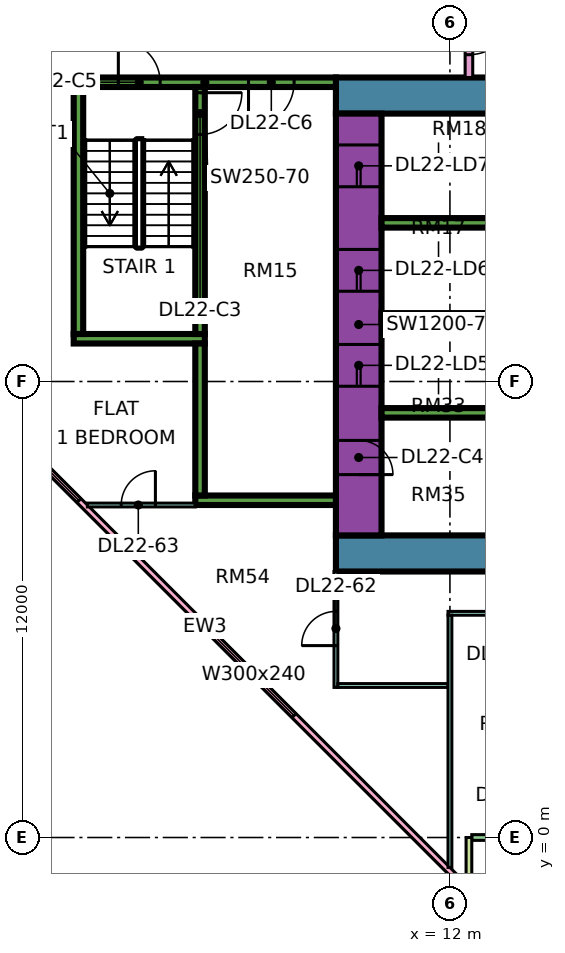
"""IFC4 building model, lengths in metres.
Left out: names, types, materials, properties, quantities, classifications, styles, units other than length and angle.
Written with IfcOpenShell. Run it as: python <this file> out.ifc"""

import sys

from ifc_helpers import new_model, si_unit, direction, frame, frame_2d, origin, place, context, subcontext, project, spatial, rectangle, extrude, element, fill, save


model = new_model("IFC4")
c1 = context("Model", 3, precision=1e-05, world=origin(), true_north=direction((0.0, 1.0)))
c2 = subcontext(c1, "Body", "Model", "MODEL_VIEW")
j1 = project(units=[si_unit("LENGTHUNIT", "METRE"), si_unit("PLANEANGLEUNIT", "RADIAN")], contexts=[c1])
p1 = place(None, origin())
s1 = spatial("IfcSite", under=j1, at=p1, CompositionType="ELEMENT")
p2 = place(p1, origin())
s2 = spatial("IfcBuilding", under=s1, at=p2, CompositionType="ELEMENT")
p3 = place(p2, frame((0.0, 0.0, 99.4)))
s3 = spatial("IfcBuildingStorey", under=s2, at=p3, CompositionType="ELEMENT", Elevation=99.4)
p4 = place(p3, frame((9.0, 7.475, 0.0), z_axis=(0.0, 0.0, 1.0), x_axis=(1.0, 0.0, 0.0)))
e1 = element("IfcWall", 1, at=p4, inside=s3, PredefinedType="SHEAR", context=c2, shape_type="SweptSolid", body=[
    extrude(rectangle(XDim=25.0, YDim=0.95, at=frame_2d((12.5, 0.0))), origin(), (0.0, 0.0, 1.0), 3.75),
])
p5 = place(p3, frame((9.0, 19.525, 0.0), z_axis=(0.0, 0.0, 1.0), x_axis=(1.0, 0.0, 0.0)))
e2 = element("IfcWall", 2, at=p5, inside=s3, PredefinedType="SHEAR", context=c2, shape_type="SweptSolid", body=[
    extrude(rectangle(XDim=25.0, YDim=0.95, at=frame_2d((12.5, 0.0))), origin(), (0.0, 0.0, 1.0), 3.75),
])
p6 = place(p5, frame((19.1, 0.0, 0.0)))
e3 = element("IfcOpeningElement", 3, at=p6, cuts=e2, PredefinedType="OPENING", context=c2, shape_type="SweptSolid", body=[
    extrude(rectangle(XDim=1.8, YDim=2.4, at=frame_2d((0.9, 1.2))), frame((0.0, 0.485, 0.0), z_axis=(0.0, -1.0, 0.0), x_axis=(1.0, 0.0, 0.0)), (0.0, 0.0, 1.0), 0.97),
])
p7 = place(p3, frame((9.6, 7.95, 0.0), z_axis=(0.0, 0.0, 1.0), x_axis=(0.0, 1.0, 0.0)))
e4 = element("IfcWall", 4, at=p7, inside=s3, PredefinedType="SHEAR", context=c2, shape_type="SweptSolid", body=[
    extrude(rectangle(XDim=11.1, YDim=1.2, at=frame_2d((5.55, 0.0))), origin(), (0.0, 0.0, 1.0), 3.75),
])
p8 = place(p7, frame((3.925, 0.0, 0.0)))
e5 = element("IfcOpeningElement", 5, at=p8, cuts=e4, PredefinedType="OPENING", context=c2, shape_type="SweptSolid", body=[
    extrude(rectangle(XDim=1.1, YDim=2.2, at=frame_2d((0.55, 1.1))), frame((0.0, 0.61, 0.0), z_axis=(0.0, -1.0, 0.0), x_axis=(1.0, 0.0, 0.0)), (0.0, 0.0, 1.0), 1.22),
])
p9 = place(p7, frame((6.425, 0.0, 0.0)))
e6 = element("IfcOpeningElement", 6, at=p9, cuts=e4, PredefinedType="OPENING", context=c2, shape_type="SweptSolid", body=[
    extrude(rectangle(XDim=1.1, YDim=2.2, at=frame_2d((0.55, 1.1))), frame((0.0, 0.61, 0.0), z_axis=(0.0, -1.0, 0.0), x_axis=(1.0, 0.0, 0.0)), (0.0, 0.0, 1.0), 1.22),
])
p10 = place(p7, frame((9.175, 0.0, 0.0)))
e7 = element("IfcOpeningElement", 7, at=p10, cuts=e4, PredefinedType="OPENING", context=c2, shape_type="SweptSolid", body=[
    extrude(rectangle(XDim=1.1, YDim=2.2, at=frame_2d((0.55, 1.1))), frame((0.0, 0.61, 0.0), z_axis=(0.0, -1.0, 0.0), x_axis=(1.0, 0.0, 0.0)), (0.0, 0.0, 1.0), 1.22),
])
p11 = place(p7, frame((1.6, 0.0, 0.0)))
e8 = element("IfcOpeningElement", 8, at=p11, cuts=e4, PredefinedType="OPENING", context=c2, shape_type="SweptSolid", body=[
    extrude(rectangle(XDim=0.9, YDim=2.1, at=frame_2d((0.45, 1.05))), frame((0.0, 0.61, 0.0), z_axis=(0.0, -1.0, 0.0), x_axis=(1.0, 0.0, 0.0)), (0.0, 0.0, 1.0), 1.22),
])
for number, where, z_axis, x_axis in (
    (9, (10.2, 11.175, 0.0), (0.0, 0.0, 1.0), (1.0, 0.0, 0.0)),
    (10, (10.2, 13.675, 0.0), (0.0, 0.0, 1.0), (1.0, 0.0, 0.0)),
    (11, (10.2, 16.175, 0.0), (0.0, 0.0, 1.0), (1.0, 0.0, 0.0)),
):
    element("IfcWall", number, at=place(p3, frame(where, z_axis=z_axis, x_axis=x_axis)), inside=s3, PredefinedType="SHEAR", context=c2, shape_type="SweptSolid", body=[
        extrude(rectangle(XDim=3.0, YDim=0.25, at=frame_2d((1.5, 0.0))), origin(), (0.0, 0.0, 1.0), 3.75),
    ])
p12 = place(p3, frame((2.1, 19.875, 0.0), z_axis=(0.0, 0.0, 1.0), x_axis=(1.0, 0.0, 0.0)))
e12 = element("IfcWall", 12, at=p12, inside=s3, PredefinedType="SHEAR", context=c2, shape_type="SweptSolid", body=[
    extrude(rectangle(XDim=6.9, YDim=0.25, at=frame_2d((3.45, 0.0))), origin(), (0.0, 0.0, 1.0), 3.75),
])
p13 = place(p12, frame((1.175, 0.0, 0.0)))
e13 = element("IfcOpeningElement", 13, at=p13, cuts=e12, PredefinedType="OPENING", context=c2, shape_type="SweptSolid", body=[
    extrude(rectangle(XDim=1.1, YDim=2.2, at=frame_2d((0.55, 1.1))), frame((0.0, 0.135, 0.0), z_axis=(0.0, -1.0, 0.0), x_axis=(1.0, 0.0, 0.0)), (0.0, 0.0, 1.0), 0.27),
])
p14 = place(p12, frame((4.6, 0.0, 0.0)))
e14 = element("IfcOpeningElement", 14, at=p14, cuts=e12, PredefinedType="OPENING", context=c2, shape_type="SweptSolid", body=[
    extrude(rectangle(XDim=1.2, YDim=2.2, at=frame_2d((0.6, 1.1))), frame((0.0, 0.135, 0.0), z_axis=(0.0, -1.0, 0.0), x_axis=(1.0, 0.0, 0.0)), (0.0, 0.0, 1.0), 0.27),
])
p15 = place(p3, frame((2.1, 13.125, 0.0), z_axis=(0.0, 0.0, 1.0), x_axis=(1.0, 0.0, 0.0)))
e15 = element("IfcWall", 15, at=p15, inside=s3, PredefinedType="SHEAR", context=c2, shape_type="SweptSolid", body=[
    extrude(rectangle(XDim=3.45, YDim=0.25, at=frame_2d((1.725, 0.0))), origin(), (0.0, 0.0, 1.0), 3.75),
])
p16 = place(p3, frame((2.225, 13.25, 0.0), z_axis=(0.0, 0.0, 1.0), x_axis=(0.0, 1.0, 0.0)))
e16 = element("IfcWall", 16, at=p16, inside=s3, PredefinedType="SHEAR", context=c2, shape_type="SweptSolid", body=[
    extrude(rectangle(XDim=6.5, YDim=0.25, at=frame_2d((3.25, 0.0))), origin(), (0.0, 0.0, 1.0), 3.75),
])
p17 = place(p3, frame((5.425, 13.25, 0.0), z_axis=(0.0, 0.0, 1.0), x_axis=(0.0, 1.0, 0.0)))
e17 = element("IfcWall", 17, at=p17, inside=s3, PredefinedType="SHEAR", context=c2, shape_type="SweptSolid", body=[
    extrude(rectangle(XDim=6.5, YDim=0.25, at=frame_2d((3.25, 0.0))), origin(), (0.0, 0.0, 1.0), 3.75),
])
p18 = place(p17, frame((5.25, 0.0, 0.0)))
e18 = element("IfcOpeningElement", 18, at=p18, cuts=e17, PredefinedType="OPENING", context=c2, shape_type="SweptSolid", body=[
    extrude(rectangle(XDim=1.1, YDim=2.2, at=frame_2d((0.55, 1.1))), frame((0.0, 0.135, 0.0), z_axis=(0.0, -1.0, 0.0), x_axis=(1.0, 0.0, 0.0)), (0.0, 0.0, 1.0), 0.27),
])
p19 = place(p3, frame((5.3, 8.875, 0.0), z_axis=(0.0, 0.0, 1.0), x_axis=(1.0, 0.0, 0.0)))
e19 = element("IfcWall", 19, at=p19, inside=s3, PredefinedType="SHEAR", context=c2, shape_type="SweptSolid", body=[
    extrude(rectangle(XDim=3.7, YDim=0.25, at=frame_2d((1.85, 0.0))), origin(), (0.0, 0.0, 1.0), 3.75),
])
p20 = place(p3, frame((5.425, 9.0, 0.0), z_axis=(0.0, 0.0, 1.0), x_axis=(0.0, 1.0, 0.0)))
e20 = element("IfcWall", 20, at=p20, inside=s3, PredefinedType="SHEAR", context=c2, shape_type="SweptSolid", body=[
    extrude(rectangle(XDim=4.0, YDim=0.25, at=frame_2d((2.0, 0.0))), origin(), (0.0, 0.0, 1.0), 3.75),
])
p21 = place(p3, frame((-1.447, 12.553, 0.0), z_axis=(0.0, 0.0, 1.0), x_axis=(0.707106781187, -0.707106781187, 0.0)))
e21 = element("IfcWall", 21, at=p21, inside=s3, PredefinedType="SOLIDWALL", context=c2, shape_type="SweptSolid", body=[
    extrude(rectangle(XDim=19.799, YDim=0.15, at=frame_2d((9.899, 0.0))), origin(), (0.0, 0.0, 1.0), 3.35),
])
p22 = place(p21, frame((2.212, 0.0, 0.45)))
e22 = element("IfcOpeningElement", 22, at=p22, cuts=e21, PredefinedType="OPENING", context=c2, shape_type="SweptSolid", body=[
    extrude(rectangle(XDim=3.0, YDim=2.4, at=frame_2d((1.5, 1.2))), frame((0.0, 0.085, 0.0), z_axis=(0.0, -1.0, 0.0), x_axis=(1.0, 0.0, 0.0)), (0.0, 0.0, 1.0), 0.17),
])
p23 = place(p21, frame((10.216, 0.0, 0.45)))
e23 = element("IfcOpeningElement", 23, at=p23, cuts=e21, PredefinedType="OPENING", context=c2, shape_type="SweptSolid", body=[
    extrude(rectangle(XDim=3.0, YDim=2.4, at=frame_2d((1.5, 1.2))), frame((0.0, 0.085, 0.0), z_axis=(0.0, -1.0, 0.0), x_axis=(1.0, 0.0, 0.0)), (0.0, 0.0, 1.0), 0.17),
])
p24 = place(p3, frame((12.575, 0.0, 0.0), z_axis=(0.0, 0.0, 1.0), x_axis=(1.0, 0.0, 0.0)))
e24 = element("IfcWall", 24, at=p24, inside=s3, PredefinedType="SOLIDWALL", context=c2, shape_type="SweptSolid", body=[
    extrude(rectangle(XDim=11.35, YDim=0.15, at=frame_2d((5.675, 0.0))), origin(), (0.0, 0.0, 1.0), 3.35),
])
p25 = place(p24, frame((0.613, 0.0, 0.0)))
e25 = element("IfcOpeningElement", 25, at=p25, cuts=e24, PredefinedType="OPENING", context=c2, shape_type="SweptSolid", body=[
    extrude(rectangle(XDim=1.2, YDim=2.4, at=frame_2d((0.6, 1.2))), frame((0.0, 0.085, 0.0), z_axis=(0.0, -1.0, 0.0), x_axis=(1.0, 0.0, 0.0)), (0.0, 0.0, 1.0), 0.17),
])
p26 = place(p24, frame((5.125, 0.0, 0.45)))
e26 = element("IfcOpeningElement", 26, at=p26, cuts=e24, PredefinedType="OPENING", context=c2, shape_type="SweptSolid", body=[
    extrude(rectangle(XDim=3.0, YDim=2.4, at=frame_2d((1.5, 1.2))), frame((0.0, 0.085, 0.0), z_axis=(0.0, -1.0, 0.0), x_axis=(1.0, 0.0, 0.0)), (0.0, 0.0, 1.0), 0.17),
])
p27 = place(p3, frame((12.5, -1.5, 0.0), z_axis=(0.0, 0.0, 1.0), x_axis=(0.0, 1.0, 0.0)))
e27 = element("IfcWall", 27, at=p27, inside=s3, PredefinedType="SOLIDWALL", context=c2, shape_type="SweptSolid", body=[
    extrude(rectangle(XDim=1.5, YDim=0.15, at=frame_2d((0.75, 0.0))), origin(), (0.0, 0.0, 1.0), 3.35),
])
p28 = place(p3, frame((0.074, 20.0, 0.0), z_axis=(0.0, 0.0, 1.0), x_axis=(1.0, 0.0, 0.0)))
e28 = element("IfcWall", 28, at=p28, inside=s3, PredefinedType="PARTITIONING", context=c2, shape_type="SweptSolid", body=[
    extrude(rectangle(XDim=2.026, YDim=0.2, at=frame_2d((1.013, 0.0))), origin(), (0.0, 0.0, 1.0), 3.35),
])
p29 = place(p3, frame((2.461, 8.75, 0.0), z_axis=(0.0, 0.0, 1.0), x_axis=(1.0, 0.0, 0.0)))
e29 = element("IfcWall", 29, at=p29, inside=s3, PredefinedType="PARTITIONING", context=c2, shape_type="SweptSolid", body=[
    extrude(rectangle(XDim=2.839, YDim=0.1, at=frame_2d((1.419, 0.0))), origin(), (0.0, 0.0, 1.0), 3.35),
])
p30 = place(p29, frame((0.889, 0.0, 0.0)))
e30 = element("IfcOpeningElement", 30, at=p30, cuts=e29, PredefinedType="OPENING", context=c2, shape_type="SweptSolid", body=[
    extrude(rectangle(XDim=0.9, YDim=2.1, at=frame_2d((0.45, 1.05))), frame((0.0, 0.06, 0.0), z_axis=(0.0, -1.0, 0.0), x_axis=(1.0, 0.0, 0.0)), (0.0, 0.0, 1.0), 0.12),
])
p31 = place(p3, frame((9.0, 3.95, 0.0), z_axis=(0.0, 0.0, 1.0), x_axis=(0.0, 1.0, 0.0)))
e31 = element("IfcWall", 31, at=p31, inside=s3, PredefinedType="PARTITIONING", context=c2, shape_type="SweptSolid", body=[
    extrude(rectangle(XDim=3.05, YDim=0.1, at=frame_2d((1.525, 0.0))), origin(), (0.0, 0.0, 1.0), 3.35),
])
p32 = place(p31, frame((1.1, 0.0, 0.0)))
e32 = element("IfcOpeningElement", 32, at=p32, cuts=e31, PredefinedType="OPENING", context=c2, shape_type="SweptSolid", body=[
    extrude(rectangle(XDim=0.9, YDim=2.1, at=frame_2d((0.45, 1.05))), frame((0.0, 0.06, 0.0), z_axis=(0.0, -1.0, 0.0), x_axis=(1.0, 0.0, 0.0)), (0.0, 0.0, 1.0), 0.12),
])
p33 = place(p3, frame((9.05, 4.0, 0.0), z_axis=(0.0, 0.0, 1.0), x_axis=(1.0, 0.0, 0.0)))
e33 = element("IfcWall", 33, at=p33, inside=s3, PredefinedType="PARTITIONING", context=c2, shape_type="SweptSolid", body=[
    extrude(rectangle(XDim=2.9, YDim=0.1, at=frame_2d((1.45, 0.0))), origin(), (0.0, 0.0, 1.0), 3.35),
])
p34 = place(p3, frame((11.95, 5.9, 0.0), z_axis=(0.0, 0.0, 1.0), x_axis=(1.0, 0.0, 0.0)))
e34 = element("IfcWall", 34, at=p34, inside=s3, PredefinedType="PARTITIONING", context=c2, shape_type="SweptSolid", body=[
    extrude(rectangle(XDim=21.1, YDim=0.1, at=frame_2d((10.55, 0.0))), origin(), (0.0, 0.0, 1.0), 3.35),
])
p35 = place(p34, frame((1.1, 0.0, 0.0)))
e35 = element("IfcOpeningElement", 35, at=p35, cuts=e34, PredefinedType="OPENING", context=c2, shape_type="SweptSolid", body=[
    extrude(rectangle(XDim=0.9, YDim=2.1, at=frame_2d((0.45, 1.05))), frame((0.0, 0.06, 0.0), z_axis=(0.0, -1.0, 0.0), x_axis=(1.0, 0.0, 0.0)), (0.0, 0.0, 1.0), 0.12),
])
p36 = place(p34, frame((13.1, 0.0, 0.0)))
e36 = element("IfcOpeningElement", 36, at=p36, cuts=e34, PredefinedType="OPENING", context=c2, shape_type="SweptSolid", body=[
    extrude(rectangle(XDim=0.9, YDim=2.1, at=frame_2d((0.45, 1.05))), frame((0.0, 0.06, 0.0), z_axis=(0.0, -1.0, 0.0), x_axis=(1.0, 0.0, 0.0)), (0.0, 0.0, 1.0), 0.12),
])
p37 = place(p34, frame((16.1, 0.0, 0.0)))
e37 = element("IfcOpeningElement", 37, at=p37, cuts=e34, PredefinedType="OPENING", context=c2, shape_type="SweptSolid", body=[
    extrude(rectangle(XDim=0.9, YDim=2.1, at=frame_2d((0.45, 1.05))), frame((0.0, 0.06, 0.0), z_axis=(0.0, -1.0, 0.0), x_axis=(1.0, 0.0, 0.0)), (0.0, 0.0, 1.0), 0.12),
])
p38 = place(p34, frame((7.1, 0.0, 0.0)))
e38 = element("IfcOpeningElement", 38, at=p38, cuts=e34, PredefinedType="OPENING", context=c2, shape_type="SweptSolid", body=[
    extrude(rectangle(XDim=0.9, YDim=2.1, at=frame_2d((0.45, 1.05))), frame((0.0, 0.06, 0.0), z_axis=(0.0, -1.0, 0.0), x_axis=(1.0, 0.0, 0.0)), (0.0, 0.0, 1.0), 0.12),
])
p39 = place(p3, frame((12.0, -0.788, 0.0), z_axis=(0.0, 0.0, 1.0), x_axis=(0.0, 1.0, 0.0)))
e39 = element("IfcWall", 39, at=p39, inside=s3, PredefinedType="PARTITIONING", context=c2, shape_type="SweptSolid", body=[
    extrude(rectangle(XDim=6.638, YDim=0.1, at=frame_2d((3.319, 0.0))), origin(), (0.0, 0.0, 1.0), 3.35),
])
p40 = place(p3, frame((12.5, 20.0, 0.0), z_axis=(0.0, 0.0, 1.0), x_axis=(0.0, 1.0, 0.0)))
e40 = element("IfcWall", 40, at=p40, inside=s3, PredefinedType="PARTITIONING", context=c2, shape_type="SweptSolid", body=[
    extrude(rectangle(XDim=42.926, YDim=0.2, at=frame_2d((21.463, 0.0))), origin(), (0.0, 0.0, 1.0), 3.35),
])
p41 = place(p40, frame((28.65, 0.0, 0.0)))
e41 = element("IfcOpeningElement", 41, at=p41, cuts=e40, PredefinedType="OPENING", context=c2, shape_type="SweptSolid", body=[
    extrude(rectangle(XDim=1.0, YDim=2.1, at=frame_2d((0.5, 1.05))), frame((0.0, 0.11, 0.0), z_axis=(0.0, -1.0, 0.0), x_axis=(1.0, 0.0, 0.0)), (0.0, 0.0, 1.0), 0.22),
])
p42 = place(p40, frame((32.1, 0.0, 0.0)))
e42 = element("IfcOpeningElement", 42, at=p42, cuts=e40, PredefinedType="OPENING", context=c2, shape_type="SweptSolid", body=[
    extrude(rectangle(XDim=1.0, YDim=2.1, at=frame_2d((0.5, 1.05))), frame((0.0, 0.11, 0.0), z_axis=(0.0, -1.0, 0.0), x_axis=(1.0, 0.0, 0.0)), (0.0, 0.0, 1.0), 0.22),
])
p43 = place(p40, frame((0.6, 0.0, 0.0)))
e43 = element("IfcOpeningElement", 43, at=p43, cuts=e40, PredefinedType="OPENING", context=c2, shape_type="SweptSolid", body=[
    extrude(rectangle(XDim=1.2, YDim=2.1, at=frame_2d((0.6, 1.05))), frame((0.0, 0.11, 0.0), z_axis=(0.0, -1.0, 0.0), x_axis=(1.0, 0.0, 0.0)), (0.0, 0.0, 1.0), 0.22),
])
p44 = place(p40, frame((13.95, 0.0, 0.0)))
e44 = element("IfcOpeningElement", 44, at=p44, cuts=e40, PredefinedType="OPENING", context=c2, shape_type="SweptSolid", body=[
    extrude(rectangle(XDim=1.0, YDim=2.1, at=frame_2d((0.5, 1.05))), frame((0.0, 0.11, 0.0), z_axis=(0.0, -1.0, 0.0), x_axis=(1.0, 0.0, 0.0)), (0.0, 0.0, 1.0), 0.22),
])
p45 = place(p22, origin())
e45 = element("IfcWindow", 45, at=p45, inside=s3, PartitioningType="SINGLE_PANEL", PredefinedType="WINDOW", context=c2, shape_type="SweptSolid", body=[
    extrude(rectangle(XDim=3.0, YDim=2.4, at=frame_2d((1.5, 1.2))), frame((0.0, 0.03, 0.0), z_axis=(0.0, -1.0, 0.0), x_axis=(1.0, 0.0, 0.0)), (0.0, 0.0, 1.0), 0.06),
])
fill(e22, e45)
p46 = place(p23, origin())
e46 = element("IfcWindow", 46, at=p46, inside=s3, PartitioningType="SINGLE_PANEL", PredefinedType="WINDOW", context=c2, shape_type="SweptSolid", body=[
    extrude(rectangle(XDim=3.0, YDim=2.4, at=frame_2d((1.5, 1.2))), frame((0.0, 0.03, 0.0), z_axis=(0.0, -1.0, 0.0), x_axis=(1.0, 0.0, 0.0)), (0.0, 0.0, 1.0), 0.06),
])
fill(e23, e46)
p47 = place(p8, origin())
e47 = element("IfcDoor", 47, at=p47, inside=s3, OperationType="DOUBLE_DOOR_SLIDING", PredefinedType="DOOR", context=c2, shape_type="SweptSolid", body=[
    extrude(rectangle(XDim=1.1, YDim=2.2, at=frame_2d((0.55, 1.1))), frame((0.0, 0.025, 0.0), z_axis=(0.0, -1.0, 0.0), x_axis=(1.0, 0.0, 0.0)), (0.0, 0.0, 1.0), 0.05),
])
fill(e5, e47)
p48 = place(p9, origin())
e48 = element("IfcDoor", 48, at=p48, inside=s3, OperationType="DOUBLE_DOOR_SLIDING", PredefinedType="DOOR", context=c2, shape_type="SweptSolid", body=[
    extrude(rectangle(XDim=1.1, YDim=2.2, at=frame_2d((0.55, 1.1))), frame((0.0, 0.025, 0.0), z_axis=(0.0, -1.0, 0.0), x_axis=(1.0, 0.0, 0.0)), (0.0, 0.0, 1.0), 0.05),
])
fill(e6, e48)
p49 = place(p10, origin())
e49 = element("IfcDoor", 49, at=p49, inside=s3, OperationType="DOUBLE_DOOR_SLIDING", PredefinedType="DOOR", context=c2, shape_type="SweptSolid", body=[
    extrude(rectangle(XDim=1.1, YDim=2.2, at=frame_2d((0.55, 1.1))), frame((0.0, 0.025, 0.0), z_axis=(0.0, -1.0, 0.0), x_axis=(1.0, 0.0, 0.0)), (0.0, 0.0, 1.0), 0.05),
])
fill(e7, e49)
p50 = place(p18, origin())
e50 = element("IfcDoor", 50, at=p50, inside=s3, OperationType="SINGLE_SWING_RIGHT", PredefinedType="DOOR", context=c2, shape_type="SweptSolid", body=[
    extrude(rectangle(XDim=1.1, YDim=2.2, at=frame_2d((0.55, 1.1))), frame((0.0, 0.025, 0.0), z_axis=(0.0, -1.0, 0.0), x_axis=(1.0, 0.0, 0.0)), (0.0, 0.0, 1.0), 0.05),
])
fill(e18, e50)
p51 = place(p11, frame((0.9, 0.0, 0.0), z_axis=(0.0, 0.0, 1.0), x_axis=(-1.0, 0.0, 0.0)))
e51 = element("IfcDoor", 51, at=p51, inside=s3, OperationType="SINGLE_SWING_LEFT", PredefinedType="DOOR", context=c2, shape_type="SweptSolid", body=[
    extrude(rectangle(XDim=0.9, YDim=2.1, at=frame_2d((0.45, 1.05))), frame((0.0, 0.025, 0.0), z_axis=(0.0, -1.0, 0.0), x_axis=(1.0, 0.0, 0.0)), (0.0, 0.0, 1.0), 0.05),
])
fill(e8, e51)
p52 = place(p13, origin())
e52 = element("IfcDoor", 52, at=p52, inside=s3, OperationType="SINGLE_SWING_LEFT", PredefinedType="DOOR", context=c2, shape_type="SweptSolid", body=[
    extrude(rectangle(XDim=1.1, YDim=2.2, at=frame_2d((0.55, 1.1))), frame((0.0, 0.025, 0.0), z_axis=(0.0, -1.0, 0.0), x_axis=(1.0, 0.0, 0.0)), (0.0, 0.0, 1.0), 0.05),
])
fill(e13, e52)
p53 = place(p14, frame((1.2, 0.0, 0.0), z_axis=(0.0, 0.0, 1.0), x_axis=(-1.0, 0.0, 0.0)))
e53 = element("IfcDoor", 53, at=p53, inside=s3, OperationType="SINGLE_SWING_LEFT", PredefinedType="DOOR", context=c2, shape_type="SweptSolid", body=[
    extrude(rectangle(XDim=1.2, YDim=2.2, at=frame_2d((0.6, 1.1))), frame((0.0, 0.025, 0.0), z_axis=(0.0, -1.0, 0.0), x_axis=(1.0, 0.0, 0.0)), (0.0, 0.0, 1.0), 0.05),
])
fill(e14, e53)
p54 = place(p43, origin())
e54 = element("IfcDoor", 54, at=p54, inside=s3, OperationType="SINGLE_SWING_RIGHT", PredefinedType="DOOR", context=c2, shape_type="SweptSolid", body=[
    extrude(rectangle(XDim=1.2, YDim=2.1, at=frame_2d((0.6, 1.05))), frame((0.0, 0.025, 0.0), z_axis=(0.0, -1.0, 0.0), x_axis=(1.0, 0.0, 0.0)), (0.0, 0.0, 1.0), 0.05),
])
fill(e43, e54)
p55 = place(p32, origin())
e55 = element("IfcDoor", 55, at=p55, inside=s3, OperationType="SINGLE_SWING_LEFT", PredefinedType="DOOR", context=c2, shape_type="SweptSolid", body=[
    extrude(rectangle(XDim=0.9, YDim=2.1, at=frame_2d((0.45, 1.05))), frame((0.0, 0.025, 0.0), z_axis=(0.0, -1.0, 0.0), x_axis=(1.0, 0.0, 0.0)), (0.0, 0.0, 1.0), 0.05),
])
fill(e32, e55)
p56 = place(p30, frame((0.9, 0.0, 0.0), z_axis=(0.0, 0.0, 1.0), x_axis=(-1.0, 0.0, 0.0)))
e56 = element("IfcDoor", 56, at=p56, inside=s3, OperationType="SINGLE_SWING_RIGHT", PredefinedType="DOOR", context=c2, shape_type="SweptSolid", body=[
    extrude(rectangle(XDim=0.9, YDim=2.1, at=frame_2d((0.45, 1.05))), frame((0.0, 0.025, 0.0), z_axis=(0.0, -1.0, 0.0), x_axis=(1.0, 0.0, 0.0)), (0.0, 0.0, 1.0), 0.05),
])
fill(e30, e56)
save(model, sys.argv[1])
